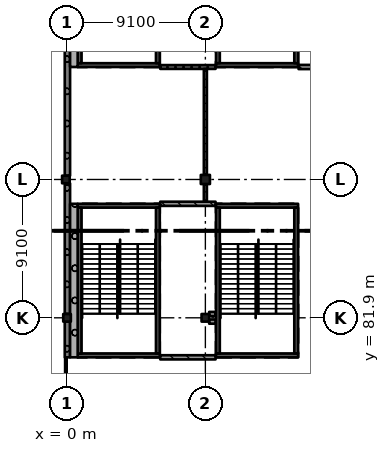
"""IFC4 building model, lengths in metres.
Left out: names, types, materials, properties, quantities, classifications, styles, units other than length and angle.
Written with IfcOpenShell. Run it as: python <this file> out.ifc"""

import sys

from ifc_helpers import new_model, si_unit, direction, frame, frame_2d, origin, origin_2d, place, context, subcontext, project, spatial, rectangle, extrude, element, fill, save


model = new_model("IFC4")
c1 = context("Model", 3, precision=1e-05, world=origin(), true_north=direction((0.0, 1.0)))
c2 = subcontext(c1, "Body", "Model", "MODEL_VIEW")
j1 = project(units=[si_unit("LENGTHUNIT", "METRE"), si_unit("PLANEANGLEUNIT", "RADIAN")], contexts=[c1])
p1 = place(None, origin())
s1 = spatial("IfcSite", under=j1, at=p1, CompositionType="ELEMENT")
p2 = place(p1, origin())
s2 = spatial("IfcBuilding", under=s1, at=p2, CompositionType="ELEMENT")
p3 = place(p2, frame((0.0, 0.0, 20.02)))
s3 = spatial("IfcBuildingStorey", under=s2, at=p3, CompositionType="ELEMENT", Elevation=20.02)
for number, where, z_axis, x_axis in (
    (1, (0.0, 81.9, 0.0), (0.0, 0.0, 1.0), (1.0, 0.0, 0.0)),
    (2, (-0.075, 91.0, 0.0), (0.0, 0.0, 1.0), (1.0, 0.0, 0.0)),
    (3, (9.1, 81.9, 0.0), (0.0, 0.0, 1.0), (1.0, 0.0, 0.0)),
):
    element("IfcColumn", number, at=place(p3, frame(where, z_axis=z_axis, x_axis=x_axis)), inside=s3, PredefinedType="COLUMN", context=c2, shape_type="SweptSolid", body=[
        extrude(rectangle(XDim=0.5, YDim=0.5, at=origin_2d()), origin(), (0.0, 0.0, 1.0), 4.55),
    ])
p4 = place(p3, frame((9.1, 91.0, 0.0), z_axis=(0.0, 0.0, 1.0), x_axis=(1.0, 0.0, 0.0)))
e4 = element("IfcColumn", 4, at=p4, inside=s3, PredefinedType="COLUMN", context=c2, shape_type="SweptSolid", body=[
    extrude(rectangle(XDim=0.6, YDim=0.6, at=origin_2d()), origin(), (0.0, 0.0, 1.0), 4.55),
])
p5 = place(p3, frame((6.1, 98.525, 0.0), z_axis=(0.0, 0.0, 1.0), x_axis=(-1.0, 0.0, 0.0)))
e5 = element("IfcWall", 5, at=p5, inside=s3, PredefinedType="SHEAR", context=c2, shape_type="SweptSolid", body=[
    extrude(rectangle(XDim=5.4, YDim=0.25, at=frame_2d((2.7, 0.0))), origin(), (0.0, 0.0, 1.0), 4.55),
])
p6 = place(p5, frame((1.5, 0.0, 0.0)))
e6 = element("IfcOpeningElement", 6, at=p6, cuts=e5, PredefinedType="OPENING", context=c2, shape_type="SweptSolid", body=[
    extrude(rectangle(XDim=2.4, YDim=2.1, at=frame_2d((1.2, 1.05))), frame((0.0, 0.135, 0.0), z_axis=(0.0, -1.0, 0.0), x_axis=(1.0, 0.0, 0.0)), (0.0, 0.0, 1.0), 0.27),
])
for number, where, z_axis, x_axis in (
    (7, (0.825, 108.25, 0.0), (0.0, 0.0, 1.0), (0.0, -1.0, 0.0)),
    (8, (5.975, 108.25, 0.0), (0.0, 0.0, 1.0), (0.0, -1.0, 0.0)),
):
    element("IfcWall", number, at=place(p3, frame(where, z_axis=z_axis, x_axis=x_axis)), inside=s3, PredefinedType="SHEAR", context=c2, shape_type="SweptSolid", body=[
        extrude(rectangle(XDim=9.6, YDim=0.25, at=frame_2d((4.8, 0.0))), origin(), (0.0, 0.0, 1.0), 4.55),
    ])
p7 = place(p3, frame((15.2, 98.525, 0.0), z_axis=(0.0, 0.0, 1.0), x_axis=(-1.0, 0.0, 0.0)))
e9 = element("IfcWall", 9, at=p7, inside=s3, PredefinedType="SHEAR", context=c2, shape_type="SweptSolid", body=[
    extrude(rectangle(XDim=5.4, YDim=0.25, at=frame_2d((2.7, 0.0))), origin(), (0.0, 0.0, 1.0), 4.55),
])
p8 = place(p7, frame((1.5, 0.0, 0.0)))
e10 = element("IfcOpeningElement", 10, at=p8, cuts=e9, PredefinedType="OPENING", context=c2, shape_type="SweptSolid", body=[
    extrude(rectangle(XDim=2.4, YDim=2.1, at=frame_2d((1.2, 1.05))), frame((0.0, 0.135, 0.0), z_axis=(0.0, -1.0, 0.0), x_axis=(1.0, 0.0, 0.0)), (0.0, 0.0, 1.0), 0.27),
])
for number, where, z_axis, x_axis in (
    (11, (9.925, 108.25, 0.0), (0.0, 0.0, 1.0), (0.0, -1.0, 0.0)),
    (12, (15.075, 108.25, 0.0), (0.0, 0.0, 1.0), (0.0, -1.0, 0.0)),
):
    element("IfcWall", number, at=place(p3, frame(where, z_axis=z_axis, x_axis=x_axis)), inside=s3, PredefinedType="SHEAR", context=c2, shape_type="SweptSolid", body=[
        extrude(rectangle(XDim=9.6, YDim=0.25, at=frame_2d((4.8, 0.0))), origin(), (0.0, 0.0, 1.0), 4.55),
    ])
p9 = place(p3, frame((6.1, 79.425, 0.0), z_axis=(0.0, 0.0, 1.0), x_axis=(-1.0, 0.0, 0.0)))
e13 = element("IfcWall", 13, at=p9, inside=s3, PredefinedType="SHEAR", context=c2, shape_type="SweptSolid", body=[
    extrude(rectangle(XDim=5.4, YDim=0.25, at=frame_2d((2.7, 0.0))), origin(), (0.0, 0.0, 1.0), 4.55),
])
p10 = place(p3, frame((6.1, 89.275, 0.0), z_axis=(0.0, 0.0, 1.0), x_axis=(-1.0, 0.0, 0.0)))
e14 = element("IfcWall", 14, at=p10, inside=s3, PredefinedType="SHEAR", context=c2, shape_type="SweptSolid", body=[
    extrude(rectangle(XDim=5.4, YDim=0.25, at=frame_2d((2.7, 0.0))), origin(), (0.0, 0.0, 1.0), 4.55),
])
p11 = place(p10, frame((1.5, 0.0, 0.0)))
e15 = element("IfcOpeningElement", 15, at=p11, cuts=e14, PredefinedType="OPENING", context=c2, shape_type="SweptSolid", body=[
    extrude(rectangle(XDim=2.4, YDim=2.1, at=frame_2d((1.2, 1.05))), frame((0.0, 0.135, 0.0), z_axis=(0.0, -1.0, 0.0), x_axis=(1.0, 0.0, 0.0)), (0.0, 0.0, 1.0), 0.27),
])
for number, where, z_axis, x_axis in (
    (16, (0.825, 89.15, 0.0), (0.0, 0.0, 1.0), (0.0, -1.0, 0.0)),
    (17, (5.975, 89.15, 0.0), (0.0, 0.0, 1.0), (0.0, -1.0, 0.0)),
):
    element("IfcWall", number, at=place(p3, frame(where, z_axis=z_axis, x_axis=x_axis)), inside=s3, PredefinedType="SHEAR", context=c2, shape_type="SweptSolid", body=[
        extrude(rectangle(XDim=9.6, YDim=0.25, at=frame_2d((4.8, 0.0))), origin(), (0.0, 0.0, 1.0), 4.55),
    ])
p12 = place(p3, frame((15.2, 79.425, 0.0), z_axis=(0.0, 0.0, 1.0), x_axis=(-1.0, 0.0, 0.0)))
e18 = element("IfcWall", 18, at=p12, inside=s3, PredefinedType="SHEAR", context=c2, shape_type="SweptSolid", body=[
    extrude(rectangle(XDim=5.4, YDim=0.25, at=frame_2d((2.7, 0.0))), origin(), (0.0, 0.0, 1.0), 4.55),
])
p13 = place(p3, frame((15.2, 89.275, 0.0), z_axis=(0.0, 0.0, 1.0), x_axis=(-1.0, 0.0, 0.0)))
e19 = element("IfcWall", 19, at=p13, inside=s3, PredefinedType="SHEAR", context=c2, shape_type="SweptSolid", body=[
    extrude(rectangle(XDim=5.4, YDim=0.25, at=frame_2d((2.7, 0.0))), origin(), (0.0, 0.0, 1.0), 4.55),
])
p14 = place(p13, frame((1.5, 0.0, 0.0)))
e20 = element("IfcOpeningElement", 20, at=p14, cuts=e19, PredefinedType="OPENING", context=c2, shape_type="SweptSolid", body=[
    extrude(rectangle(XDim=2.4, YDim=2.1, at=frame_2d((1.2, 1.05))), frame((0.0, 0.135, 0.0), z_axis=(0.0, -1.0, 0.0), x_axis=(1.0, 0.0, 0.0)), (0.0, 0.0, 1.0), 0.27),
])
for number, where, z_axis, x_axis in (
    (21, (9.925, 89.15, 0.0), (0.0, 0.0, 1.0), (0.0, -1.0, 0.0)),
    (22, (15.075, 89.15, 0.0), (0.0, 0.0, 1.0), (0.0, -1.0, 0.0)),
):
    element("IfcWall", number, at=place(p3, frame(where, z_axis=z_axis, x_axis=x_axis)), inside=s3, PredefinedType="SHEAR", context=c2, shape_type="SweptSolid", body=[
        extrude(rectangle(XDim=9.6, YDim=0.25, at=frame_2d((4.8, 0.0))), origin(), (0.0, 0.0, 1.0), 4.55),
    ])
for number, where, z_axis, x_axis in (
    (23, (0.025, 99.85, 0.0), (0.0, 0.0, 1.0), (0.0, -1.0, 0.0)),
    (24, (0.025, 90.75, 0.0), (0.0, 0.0, 1.0), (0.0, -1.0, 0.0)),
):
    element("IfcWall", number, at=place(p3, frame(where, z_axis=z_axis, x_axis=x_axis)), inside=s3, PredefinedType="SOLIDWALL", context=c2, shape_type="SweptSolid", body=[
        extrude(rectangle(XDim=8.6, YDim=0.35, at=frame_2d((4.3, 0.0))), origin(), (0.0, 0.0, 1.0), 3.5),
    ])
p15 = place(p3, frame((0.025, 81.65, 0.0), z_axis=(0.0, 0.0, 1.0), x_axis=(0.0, -1.0, 0.0)))
e25 = element("IfcWall", 25, at=p15, inside=s3, PredefinedType="SOLIDWALL", context=c2, shape_type="SweptSolid", body=[
    extrude(rectangle(XDim=2.35, YDim=0.35, at=frame_2d((1.175, 0.0))), origin(), (0.0, 0.0, 1.0), 3.5),
])
p16 = place(p3, frame((0.45, 98.4, 0.0), z_axis=(0.0, 0.0, 1.0), x_axis=(0.0, 1.0, 0.0)))
e26 = element("IfcWall", 26, at=p16, inside=s3, PredefinedType="SOLIDWALL", context=c2, shape_type="SweptSolid", body=[
    extrude(rectangle(XDim=10.1, YDim=0.5, at=frame_2d((5.05, 0.0))), origin(), (0.0, 0.0, 1.0), 4.25),
])
p17 = place(p3, frame((0.45, 79.3, 0.0), z_axis=(0.0, 0.0, 1.0), x_axis=(0.0, 1.0, 0.0)))
e27 = element("IfcWall", 27, at=p17, inside=s3, PredefinedType="SOLIDWALL", context=c2, shape_type="SweptSolid", body=[
    extrude(rectangle(XDim=10.1, YDim=0.5, at=frame_2d((5.05, 0.0))), origin(), (0.0, 0.0, 1.0), 4.25),
])
p18 = place(p3, frame((6.13, 98.4, 0.0), z_axis=(0.0, 0.0, 1.0), x_axis=(1.0, 0.0, 0.0)))
e28 = element("IfcWall", 28, at=p18, inside=s3, PredefinedType="SOLIDWALL", context=c2, shape_type="SweptSolid", body=[
    extrude(rectangle(XDim=3.64, YDim=0.25, at=frame_2d((1.82, 0.0))), origin(), (0.0, 0.0, 1.0), 4.25),
])
p19 = place(p18, frame((0.95, 0.0, 0.0)))
e29 = element("IfcOpeningElement", 29, at=p19, cuts=e28, PredefinedType="OPENING", context=c2, shape_type="SweptSolid", body=[
    extrude(rectangle(XDim=1.0, YDim=2.1, at=frame_2d((0.5, 1.05))), frame((0.0, 0.135, 0.0), z_axis=(0.0, -1.0, 0.0), x_axis=(1.0, 0.0, 0.0)), (0.0, 0.0, 1.0), 0.27),
])
p20 = place(p3, frame((6.13, 89.4, 0.0), z_axis=(0.0, 0.0, 1.0), x_axis=(1.0, 0.0, 0.0)))
e30 = element("IfcWall", 30, at=p20, inside=s3, PredefinedType="SOLIDWALL", context=c2, shape_type="SweptSolid", body=[
    extrude(rectangle(XDim=3.64, YDim=0.275, at=frame_2d((1.82, 0.0))), origin(), (0.0, 0.0, 1.0), 4.25),
])
p21 = place(p20, frame((0.92, 0.0, 0.0)))
e31 = element("IfcOpeningElement", 31, at=p21, cuts=e30, PredefinedType="OPENING", context=c2, shape_type="SweptSolid", body=[
    extrude(rectangle(XDim=1.2, YDim=2.4, at=frame_2d((0.6, 1.2))), frame((0.0, 0.147, 0.0), z_axis=(0.0, -1.0, 0.0), x_axis=(1.0, 0.0, 0.0)), (0.0, 0.0, 1.0), 0.295),
])
p22 = place(p3, frame((9.1, 90.7, 0.0), z_axis=(0.0, 0.0, 1.0), x_axis=(0.0, -1.0, 0.0)))
e32 = element("IfcWall", 32, at=p22, inside=s3, PredefinedType="PARTITIONING", context=c2, shape_type="SweptSolid", body=[
    extrude(rectangle(XDim=1.162, YDim=0.2, at=frame_2d((0.581, 0.0))), origin(), (0.0, 0.0, 1.0), 3.5),
])
p23 = place(p3, frame((9.1, 98.275, 0.0), z_axis=(0.0, 0.0, 1.0), x_axis=(0.0, -1.0, 0.0)))
e33 = element("IfcWall", 33, at=p23, inside=s3, PredefinedType="PARTITIONING", context=c2, shape_type="SweptSolid", body=[
    extrude(rectangle(XDim=6.975, YDim=0.2, at=frame_2d((3.487, 0.0))), origin(), (0.0, 0.0, 1.0), 3.5),
])
p24 = place(p23, frame((0.85, 0.0, 0.0)))
e34 = element("IfcOpeningElement", 34, at=p24, cuts=e33, PredefinedType="OPENING", context=c2, shape_type="SweptSolid", body=[
    extrude(rectangle(XDim=1.8, YDim=2.4, at=frame_2d((0.9, 1.2))), frame((0.0, 0.11, 0.0), z_axis=(0.0, -1.0, 0.0), x_axis=(1.0, 0.0, 0.0)), (0.0, 0.0, 1.0), 0.22),
])
p25 = place(p23, frame((4.35, 0.0, 0.0)))
e35 = element("IfcOpeningElement", 35, at=p25, cuts=e33, PredefinedType="OPENING", context=c2, shape_type="SweptSolid", body=[
    extrude(rectangle(XDim=1.8, YDim=2.4, at=frame_2d((0.9, 1.2))), frame((0.0, 0.11, 0.0), z_axis=(0.0, -1.0, 0.0), x_axis=(1.0, 0.0, 0.0)), (0.0, 0.0, 1.0), 0.22),
])
p26 = place(p3, frame((9.35, 81.65, 0.0), z_axis=(0.0, 0.0, 1.0), x_axis=(1.0, 0.0, 0.0)))
e36 = element("IfcWall", 36, at=p26, inside=s3, PredefinedType="SOLIDWALL", context=c2, shape_type="SweptSolid", body=[
    extrude(rectangle(XDim=0.42, YDim=0.275, at=frame_2d((0.21, 0.0))), origin(), (0.0, 0.0, 1.0), 4.25),
])
p27 = place(p3, frame((9.77, 79.3, 0.0), z_axis=(0.0, 0.0, 1.0), x_axis=(-1.0, 0.0, 0.0)))
e37 = element("IfcWall", 37, at=p27, inside=s3, PredefinedType="SOLIDWALL", context=c2, shape_type="SweptSolid", body=[
    extrude(rectangle(XDim=3.64, YDim=0.275, at=frame_2d((1.82, 0.0))), origin(), (0.0, 0.0, 1.0), 4.25),
])
p28 = place(p3, frame((9.77, 82.15, 0.0), z_axis=(0.0, 0.0, 1.0), x_axis=(-1.0, 0.0, 0.0)))
e38 = element("IfcWall", 38, at=p28, inside=s3, PredefinedType="SOLIDWALL", context=c2, shape_type="SweptSolid", body=[
    extrude(rectangle(XDim=0.42, YDim=0.275, at=frame_2d((0.21, 0.0))), origin(), (0.0, 0.0, 1.0), 4.25),
])
p29 = place(p3, frame((15.23, 98.4, 0.0), z_axis=(0.0, 0.0, 1.0), x_axis=(1.0, 0.0, 0.0)))
e39 = element("IfcWall", 39, at=p29, inside=s3, PredefinedType="SOLIDWALL", context=c2, shape_type="SweptSolid", body=[
    extrude(rectangle(XDim=3.64, YDim=0.275, at=frame_2d((1.82, 0.0))), origin(), (0.0, 0.0, 1.0), 4.25),
])
p30 = place(p29, frame((1.25, 0.0, 0.0)))
e40 = element("IfcOpeningElement", 40, at=p30, cuts=e39, PredefinedType="OPENING", context=c2, shape_type="SweptSolid", body=[
    extrude(rectangle(XDim=1.2, YDim=2.4, at=frame_2d((0.6, 1.2))), frame((0.0, 0.147, 0.0), z_axis=(0.0, -1.0, 0.0), x_axis=(1.0, 0.0, 0.0)), (0.0, 0.0, 1.0), 0.295),
])
p31 = place(p21, origin())
e41 = element("IfcDoor", 41, at=p31, inside=s3, OperationType="SINGLE_SWING_RIGHT", PredefinedType="DOOR", context=c2, shape_type="SweptSolid", body=[
    extrude(rectangle(XDim=1.2, YDim=2.4, at=frame_2d((0.6, 1.2))), frame((0.0, 0.025, 0.0), z_axis=(0.0, -1.0, 0.0), x_axis=(1.0, 0.0, 0.0)), (0.0, 0.0, 1.0), 0.05),
])
fill(e31, e41)
p32 = place(p19, origin())
e42 = element("IfcDoor", 42, at=p32, inside=s3, OperationType="SINGLE_SWING_RIGHT", PredefinedType="DOOR", context=c2, shape_type="SweptSolid", body=[
    extrude(rectangle(XDim=1.0, YDim=2.1, at=frame_2d((0.5, 1.05))), frame((0.0, 0.025, 0.0), z_axis=(0.0, -1.0, 0.0), x_axis=(1.0, 0.0, 0.0)), (0.0, 0.0, 1.0), 0.05),
])
fill(e29, e42)
p33 = place(p24, origin())
e43 = element("IfcDoor", 43, at=p33, inside=s3, OperationType="DOUBLE_DOOR_SINGLE_SWING", PredefinedType="DOOR", context=c2, shape_type="SweptSolid", body=[
    extrude(rectangle(XDim=1.8, YDim=2.4, at=frame_2d((0.9, 1.2))), frame((0.0, 0.025, 0.0), z_axis=(0.0, -1.0, 0.0), x_axis=(1.0, 0.0, 0.0)), (0.0, 0.0, 1.0), 0.05),
])
fill(e34, e43)
p34 = place(p25, origin())
e44 = element("IfcDoor", 44, at=p34, inside=s3, OperationType="DOUBLE_DOOR_SINGLE_SWING", PredefinedType="DOOR", context=c2, shape_type="SweptSolid", body=[
    extrude(rectangle(XDim=1.8, YDim=2.4, at=frame_2d((0.9, 1.2))), frame((0.0, 0.025, 0.0), z_axis=(0.0, -1.0, 0.0), x_axis=(1.0, 0.0, 0.0)), (0.0, 0.0, 1.0), 0.05),
])
fill(e35, e44)
p35 = place(p6, origin())
e45 = element("IfcDoor", 45, at=p35, inside=s3, OperationType="DOUBLE_DOOR_SINGLE_SWING", PredefinedType="DOOR", context=c2, shape_type="SweptSolid", body=[
    extrude(rectangle(XDim=2.4, YDim=2.1, at=frame_2d((1.2, 1.05))), frame((0.0, 0.025, 0.0), z_axis=(0.0, -1.0, 0.0), x_axis=(1.0, 0.0, 0.0)), (0.0, 0.0, 1.0), 0.05),
])
fill(e6, e45)
p36 = place(p8, origin())
e46 = element("IfcDoor", 46, at=p36, inside=s3, OperationType="DOUBLE_DOOR_SINGLE_SWING", PredefinedType="DOOR", context=c2, shape_type="SweptSolid", body=[
    extrude(rectangle(XDim=2.4, YDim=2.1, at=frame_2d((1.2, 1.05))), frame((0.0, 0.025, 0.0), z_axis=(0.0, -1.0, 0.0), x_axis=(1.0, 0.0, 0.0)), (0.0, 0.0, 1.0), 0.05),
])
fill(e10, e46)
p37 = place(p11, origin())
e47 = element("IfcDoor", 47, at=p37, inside=s3, OperationType="DOUBLE_DOOR_SINGLE_SWING", PredefinedType="DOOR", context=c2, shape_type="SweptSolid", body=[
    extrude(rectangle(XDim=2.4, YDim=2.1, at=frame_2d((1.2, 1.05))), frame((0.0, 0.025, 0.0), z_axis=(0.0, -1.0, 0.0), x_axis=(1.0, 0.0, 0.0)), (0.0, 0.0, 1.0), 0.05),
])
fill(e15, e47)
p38 = place(p14, origin())
e48 = element("IfcDoor", 48, at=p38, inside=s3, OperationType="DOUBLE_DOOR_SINGLE_SWING", PredefinedType="DOOR", context=c2, shape_type="SweptSolid", body=[
    extrude(rectangle(XDim=2.4, YDim=2.1, at=frame_2d((1.2, 1.05))), frame((0.0, 0.025, 0.0), z_axis=(0.0, -1.0, 0.0), x_axis=(1.0, 0.0, 0.0)), (0.0, 0.0, 1.0), 0.05),
])
fill(e20, e48)
save(model, sys.argv[1])
